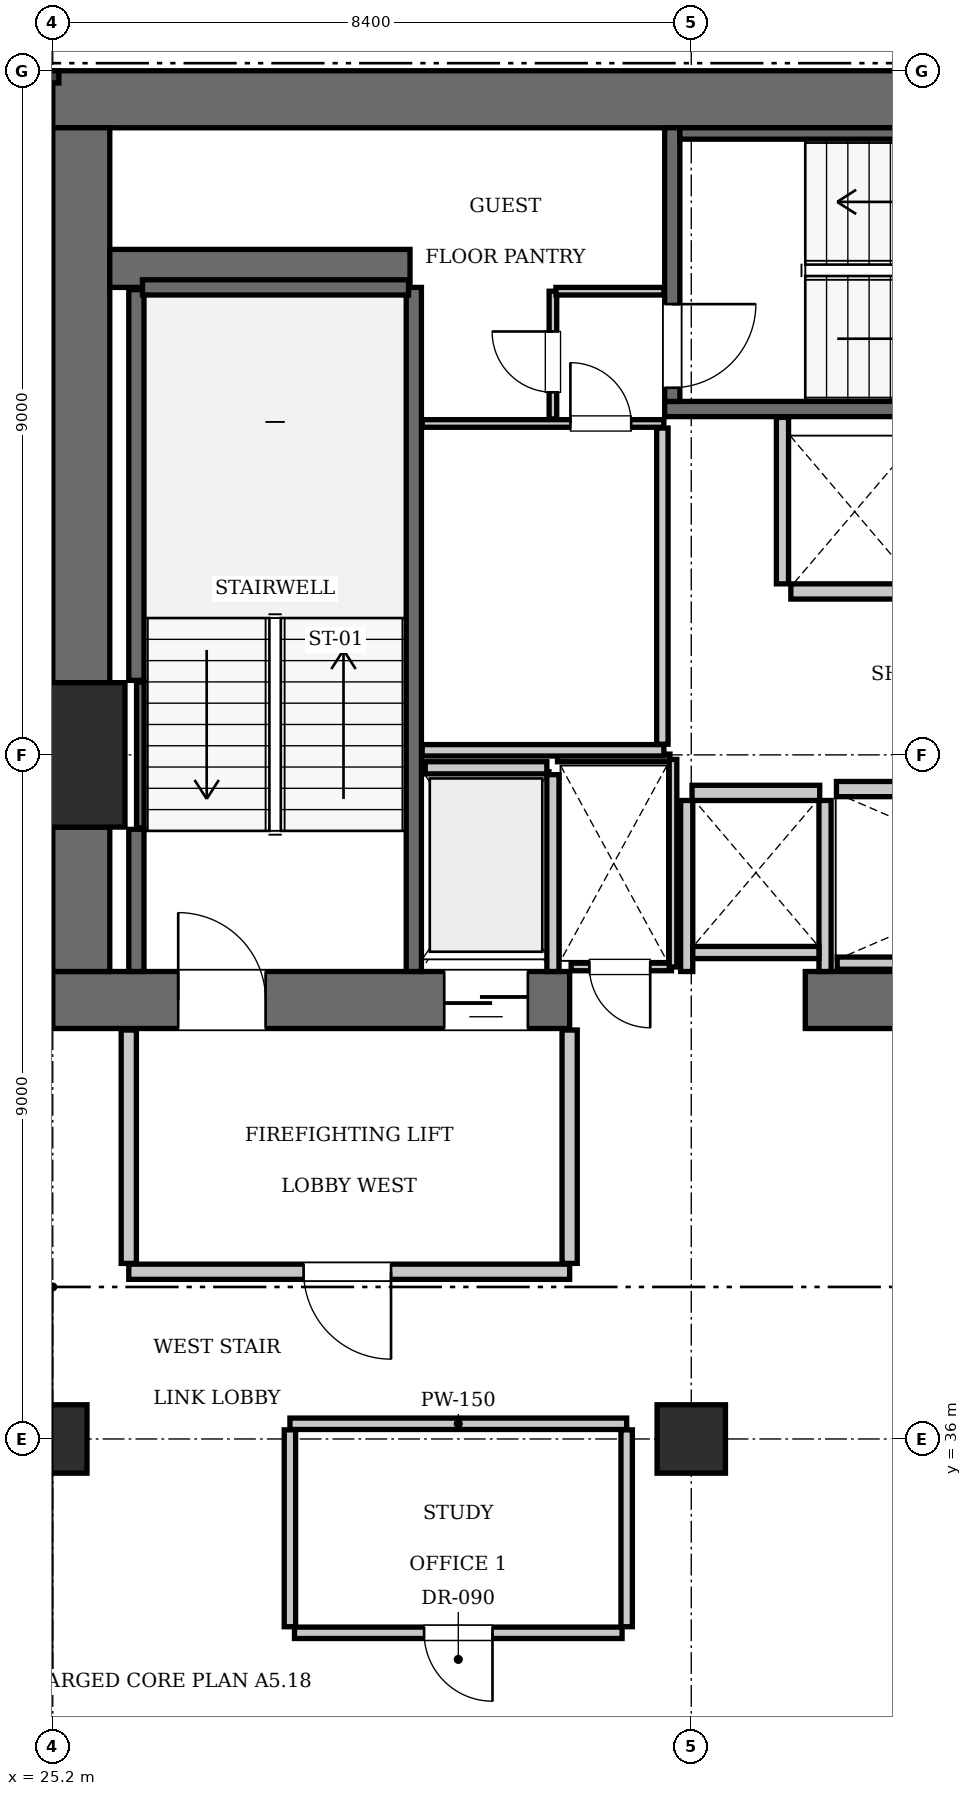
"""IFC4 building model, lengths in metres.
Left out: names, types, materials, properties, quantities, classifications, styles, units other than length and angle.
Written with IfcOpenShell. Run it as: python <this file> out.ifc"""

import sys

from ifc_helpers import new_model, si_unit, direction, frame, frame_2d, origin, origin_2d, place, context, subcontext, project, spatial, rectangle, extrude, element, fill, save


model = new_model("IFC4")
c1 = context("Model", 3, precision=1e-05, world=origin(), true_north=direction((0.0, 1.0)))
c2 = subcontext(c1, "Body", "Model", "MODEL_VIEW")
j1 = project(units=[si_unit("LENGTHUNIT", "METRE"), si_unit("PLANEANGLEUNIT", "RADIAN")], contexts=[c1])
p1 = place(None, origin())
s1 = spatial("IfcSite", under=j1, at=p1, CompositionType="ELEMENT")
p2 = place(p1, origin())
s2 = spatial("IfcBuilding", under=s1, at=p2, CompositionType="ELEMENT")
p3 = place(p2, frame((0.0, 0.0, 154.35)))
s3 = spatial("IfcBuildingStorey", under=s2, at=p3, CompositionType="ELEMENT", Elevation=154.35)
p4 = place(p3, frame((25.2, 45.0, 0.0), z_axis=(0.0, 0.0, 1.0), x_axis=(1.0, 0.0, 0.0)))
e1 = element("IfcColumn", 1, at=p4, inside=s3, PredefinedType="COLUMN", context=c2, shape_type="SweptSolid", body=[
    extrude(rectangle(XDim=1.9, YDim=1.9, at=origin_2d()), origin(), (0.0, 0.0, 1.0), 3.85),
])
p5 = place(p3, frame((25.2, 53.625, 0.0), z_axis=(0.0, 0.0, 1.0), x_axis=(1.0, 0.0, 0.0)))
e2 = element("IfcWall", 2, at=p5, inside=s3, PredefinedType="SHEAR", context=c2, shape_type="SweptSolid", body=[
    extrude(rectangle(XDim=25.2, YDim=0.75, at=frame_2d((12.6, 0.0))), origin(), (0.0, 0.0, 1.0), 3.85),
])
p6 = place(p3, frame((25.2, 41.775, 0.0), z_axis=(0.0, 0.0, 1.0), x_axis=(1.0, 0.0, 0.0)))
e3 = element("IfcWall", 3, at=p6, inside=s3, PredefinedType="SHEAR", context=c2, shape_type="SweptSolid", body=[
    extrude(rectangle(XDim=6.8, YDim=0.75, at=frame_2d((3.4, 0.0))), origin(), (0.0, 0.0, 1.0), 3.85),
])
p7 = place(p6, frame((1.65, 0.0, 0.0)))
e4 = element("IfcOpeningElement", 4, at=p7, cuts=e3, PredefinedType="OPENING", context=c2, shape_type="SweptSolid", body=[
    extrude(rectangle(XDim=1.15, YDim=2.15, at=frame_2d((0.575, 1.075))), frame((0.0, 0.385, 0.0), z_axis=(0.0, -1.0, 0.0), x_axis=(1.0, 0.0, 0.0)), (0.0, 0.0, 1.0), 0.77),
])
p8 = place(p6, frame((5.15, 0.0, 0.0)))
e5 = element("IfcOpeningElement", 5, at=p8, cuts=e3, PredefinedType="OPENING", context=c2, shape_type="SweptSolid", body=[
    extrude(rectangle(XDim=1.1, YDim=2.2, at=frame_2d((0.55, 1.1))), frame((0.0, 0.385, 0.0), z_axis=(0.0, -1.0, 0.0), x_axis=(1.0, 0.0, 0.0)), (0.0, 0.0, 1.0), 0.77),
])
p9 = place(p3, frame((35.1, 41.775, 0.0), z_axis=(0.0, 0.0, 1.0), x_axis=(1.0, 0.0, 0.0)))
e6 = element("IfcWall", 6, at=p9, inside=s3, PredefinedType="SHEAR", context=c2, shape_type="SweptSolid", body=[
    extrude(rectangle(XDim=5.4, YDim=0.75, at=frame_2d((2.7, 0.0))), origin(), (0.0, 0.0, 1.0), 3.85),
])
p10 = place(p3, frame((25.575, 42.15, 0.0), z_axis=(0.0, 0.0, 1.0), x_axis=(0.0, 1.0, 0.0)))
e7 = element("IfcWall", 7, at=p10, inside=s3, PredefinedType="SHEAR", context=c2, shape_type="SweptSolid", body=[
    extrude(rectangle(XDim=1.9, YDim=0.75, at=frame_2d((0.95, 0.0))), origin(), (0.0, 0.0, 1.0), 3.85),
])
p11 = place(p3, frame((25.575, 45.95, 0.0), z_axis=(0.0, 0.0, 1.0), x_axis=(0.0, 1.0, 0.0)))
e8 = element("IfcWall", 8, at=p11, inside=s3, PredefinedType="SHEAR", context=c2, shape_type="SweptSolid", body=[
    extrude(rectangle(XDim=7.3, YDim=0.75, at=frame_2d((3.65, 0.0))), origin(), (0.0, 0.0, 1.0), 3.85),
])
p12 = place(p3, frame((25.95, 51.4, 0.0), z_axis=(0.0, 0.0, 1.0), x_axis=(1.0, 0.0, 0.0)))
e9 = element("IfcWall", 9, at=p12, inside=s3, PredefinedType="SHEAR", context=c2, shape_type="SweptSolid", body=[
    extrude(rectangle(XDim=3.95, YDim=0.5, at=frame_2d((1.975, 0.0))), origin(), (0.0, 0.0, 1.0), 3.85),
])
for number, where, z_axis, x_axis in (
    (10, (25.2, 36.0, 0.0), (0.0, 0.0, 1.0), (1.0, 0.0, 0.0)),
    (11, (33.6, 36.0, 0.0), (0.0, 0.0, 1.0), (1.0, 0.0, 0.0)),
):
    element("IfcColumn", number, at=place(p3, frame(where, z_axis=z_axis, x_axis=x_axis)), inside=s3, PredefinedType="COLUMN", context=c2, shape_type="SweptSolid", body=[
        extrude(rectangle(XDim=0.9, YDim=0.9, at=origin_2d()), origin(), (0.0, 0.0, 1.0), 3.85),
    ])
p13 = place(p3, frame((29.95, 42.15, 0.0), z_axis=(0.0, 0.0, 1.0), x_axis=(0.0, 1.0, 0.0)))
e12 = element("IfcWall", 12, at=p13, inside=s3, PredefinedType="SOLIDWALL", context=c2, shape_type="SweptSolid", body=[
    extrude(rectangle(XDim=9.0, YDim=0.2, at=frame_2d((4.5, 0.0))), origin(), (0.0, 0.0, 1.0), 3.61),
])
p14 = place(p3, frame((26.3, 42.15, 0.0), z_axis=(0.0, 0.0, 1.0), x_axis=(0.0, 1.0, 0.0)))
e13 = element("IfcWall", 13, at=p14, inside=s3, PredefinedType="SOLIDWALL", context=c2, shape_type="SweptSolid", body=[
    extrude(rectangle(XDim=1.87, YDim=0.2, at=frame_2d((0.935, 0.0))), origin(), (0.0, 0.0, 1.0), 3.61),
])
p15 = place(p3, frame((26.3, 45.98, 0.0), z_axis=(0.0, 0.0, 1.0), x_axis=(0.0, 1.0, 0.0)))
e14 = element("IfcWall", 14, at=p15, inside=s3, PredefinedType="SOLIDWALL", context=c2, shape_type="SweptSolid", body=[
    extrude(rectangle(XDim=5.14, YDim=0.2, at=frame_2d((2.57, 0.0))), origin(), (0.0, 0.0, 1.0), 3.61),
])
p16 = place(p3, frame((26.38, 51.15, 0.0), z_axis=(0.0, 0.0, 1.0), x_axis=(1.0, 0.0, 0.0)))
e15 = element("IfcWall", 15, at=p16, inside=s3, PredefinedType="SOLIDWALL", context=c2, shape_type="SweptSolid", body=[
    extrude(rectangle(XDim=3.5, YDim=0.2, at=frame_2d((1.75, 0.0))), origin(), (0.0, 0.0, 1.0), 3.61),
])
p17 = place(p3, frame((26.352, 44.04, 0.0), z_axis=(0.0, 0.0, 1.0), x_axis=(0.0, 1.0, 0.0)))
e16 = element("IfcWall", 16, at=p17, inside=s3, PredefinedType="SOLIDWALL", context=c2, shape_type="SweptSolid", body=[
    extrude(rectangle(XDim=1.92, YDim=0.1, at=frame_2d((0.96, 0.0))), origin(), (0.0, 0.0, 1.0), 3.61),
])
p18 = place(p3, frame((33.25, 49.55, 0.0), z_axis=(0.0, 0.0, 1.0), x_axis=(1.0, 0.0, 0.0)))
e17 = element("IfcWall", 17, at=p18, inside=s3, PredefinedType="SOLIDWALL", context=c2, shape_type="SweptSolid", body=[
    extrude(rectangle(XDim=9.1, YDim=0.2, at=frame_2d((4.55, 0.0))), origin(), (0.0, 0.0, 1.0), 3.61),
])
p19 = place(p3, frame((33.35, 49.65, 0.0), z_axis=(0.0, 0.0, 1.0), x_axis=(0.0, 1.0, 0.0)))
e18 = element("IfcWall", 18, at=p19, inside=s3, PredefinedType="SOLIDWALL", context=c2, shape_type="SweptSolid", body=[
    extrude(rectangle(XDim=3.6, YDim=0.2, at=frame_2d((1.8, 0.0))), origin(), (0.0, 0.0, 1.0), 3.61),
])
p20 = place(p19, frame((0.18, 0.0, 0.0)))
e19 = element("IfcOpeningElement", 19, at=p20, cuts=e18, PredefinedType="OPENING", context=c2, shape_type="SweptSolid", body=[
    extrude(rectangle(XDim=1.1, YDim=2.15, at=frame_2d((0.55, 1.075))), frame((0.0, 0.11, 0.0), z_axis=(0.0, -1.0, 0.0), x_axis=(1.0, 0.0, 0.0)), (0.0, 0.0, 1.0), 0.22),
])
p21 = place(p3, frame((33.45, 53.175, 0.0), z_axis=(0.0, 0.0, 1.0), x_axis=(1.0, 0.0, 0.0)))
e20 = element("IfcWall", 20, at=p21, inside=s3, PredefinedType="SOLIDWALL", context=c2, shape_type="SweptSolid", body=[
    extrude(rectangle(XDim=8.7, YDim=0.15, at=frame_2d((4.35, 0.0))), origin(), (0.0, 0.0, 1.0), 3.61),
])
p22 = place(p3, frame((35.51, 44.55, 0.0), z_axis=(0.0, 0.0, 1.0), x_axis=(1.0, 0.0, 0.0)))
e21 = element("IfcWall", 21, at=p22, inside=s3, PredefinedType="SOLIDWALL", context=c2, shape_type="SweptSolid", body=[
    extrude(rectangle(XDim=1.68, YDim=0.2, at=frame_2d((0.84, 0.0))), origin(), (0.0, 0.0, 1.0), 3.61),
])
p23 = place(p3, frame((34.91, 47.15, 0.0), z_axis=(0.0, 0.0, 1.0), x_axis=(1.0, 0.0, 0.0)))
e22 = element("IfcWall", 22, at=p23, inside=s3, PredefinedType="SOLIDWALL", context=c2, shape_type="SweptSolid", body=[
    extrude(rectangle(XDim=1.68, YDim=0.2, at=frame_2d((0.84, 0.0))), origin(), (0.0, 0.0, 1.0), 3.61),
])
p24 = place(p3, frame((33.61, 44.5, 0.0), z_axis=(0.0, 0.0, 1.0), x_axis=(1.0, 0.0, 0.0)))
e23 = element("IfcWall", 23, at=p24, inside=s3, PredefinedType="SOLIDWALL", context=c2, shape_type="SweptSolid", body=[
    extrude(rectangle(XDim=1.68, YDim=0.2, at=frame_2d((0.84, 0.0))), origin(), (0.0, 0.0, 1.0), 3.61),
])
p25 = place(p3, frame((30.1, 44.83, 0.0), z_axis=(0.0, 0.0, 1.0), x_axis=(1.0, 0.0, 0.0)))
e24 = element("IfcWall", 24, at=p25, inside=s3, PredefinedType="SOLIDWALL", context=c2, shape_type="SweptSolid", body=[
    extrude(rectangle(XDim=1.6, YDim=0.16, at=frame_2d((0.8, 0.0))), origin(), (0.0, 0.0, 1.0), 3.61),
])
p26 = place(p3, frame((31.78, 42.15, 0.0), z_axis=(0.0, 0.0, 1.0), x_axis=(0.0, 1.0, 0.0)))
e25 = element("IfcWall", 25, at=p26, inside=s3, PredefinedType="SOLIDWALL", context=c2, shape_type="SweptSolid", body=[
    extrude(rectangle(XDim=2.59, YDim=0.16, at=frame_2d((1.295, 0.0))), origin(), (0.0, 0.0, 1.0), 3.61),
])
p27 = place(p3, frame((35.52, 42.26, 0.0), z_axis=(0.0, 0.0, 1.0), x_axis=(1.0, 0.0, 0.0)))
e26 = element("IfcWall", 26, at=p27, inside=s3, PredefinedType="SOLIDWALL", context=c2, shape_type="SweptSolid", body=[
    extrude(rectangle(XDim=5.02, YDim=0.16, at=frame_2d((2.51, 0.0))), origin(), (0.0, 0.0, 1.0), 3.61),
])
p28 = place(p3, frame((34.8, 47.25, 0.0), z_axis=(0.0, 0.0, 1.0), x_axis=(0.0, 1.0, 0.0)))
e27 = element("IfcWall", 27, at=p28, inside=s3, PredefinedType="SOLIDWALL", context=c2, shape_type="SweptSolid", body=[
    extrude(rectangle(XDim=2.19, YDim=0.16, at=frame_2d((1.095, 0.0))), origin(), (0.0, 0.0, 1.0), 3.61),
])
for number, where, z_axis, x_axis in (
    (28, (33.54, 42.15, 0.0), (0.0, 0.0, 1.0), (0.0, 1.0, 0.0)),
    (29, (35.36, 42.15, 0.0), (0.0, 0.0, 1.0), (0.0, 1.0, 0.0)),
):
    element("IfcWall", number, at=place(p3, frame(where, z_axis=z_axis, x_axis=x_axis)), inside=s3, PredefinedType="SOLIDWALL", context=c2, shape_type="SweptSolid", body=[
        extrude(rectangle(XDim=2.25, YDim=0.16, at=frame_2d((1.125, 0.0))), origin(), (0.0, 0.0, 1.0), 3.61),
    ])
p29 = place(p3, frame((33.62, 42.4, 0.0), z_axis=(0.0, 0.0, 1.0), x_axis=(1.0, 0.0, 0.0)))
e30 = element("IfcWall", 30, at=p29, inside=s3, PredefinedType="SOLIDWALL", context=c2, shape_type="SweptSolid", body=[
    extrude(rectangle(XDim=1.66, YDim=0.16, at=frame_2d((0.83, 0.0))), origin(), (0.0, 0.0, 1.0), 3.61),
])
p30 = place(p3, frame((26.2, 38.2, 0.0), z_axis=(0.0, 0.0, 1.0), x_axis=(1.0, 0.0, 0.0)))
e31 = element("IfcWall", 31, at=p30, inside=s3, PredefinedType="PARTITIONING", context=c2, shape_type="SweptSolid", body=[
    extrude(rectangle(XDim=5.8, YDim=0.2, at=frame_2d((2.9, 0.0))), origin(), (0.0, 0.0, 1.0), 3.61),
])
p31 = place(p30, frame((2.3, 0.0, 0.0)))
e32 = element("IfcOpeningElement", 32, at=p31, cuts=e31, PredefinedType="OPENING", context=c2, shape_type="SweptSolid", body=[
    extrude(rectangle(XDim=1.15, YDim=2.15, at=frame_2d((0.575, 1.075))), frame((0.0, 0.11, 0.0), z_axis=(0.0, -1.0, 0.0), x_axis=(1.0, 0.0, 0.0)), (0.0, 0.0, 1.0), 0.22),
])
for number, where, z_axis, x_axis in (
    (33, (26.2, 38.31, 0.0), (0.0, 0.0, 1.0), (0.0, 1.0, 0.0)),
    (34, (32.0, 38.31, 0.0), (0.0, 0.0, 1.0), (0.0, 1.0, 0.0)),
):
    element("IfcWall", number, at=place(p3, frame(where, z_axis=z_axis, x_axis=x_axis)), inside=s3, PredefinedType="PARTITIONING", context=c2, shape_type="SweptSolid", body=[
        extrude(rectangle(XDim=3.07, YDim=0.2, at=frame_2d((1.535, 0.0))), origin(), (0.0, 0.0, 1.0), 3.61),
    ])
p32 = place(p3, frame((32.02, 42.21, 0.0), z_axis=(0.0, 0.0, 1.0), x_axis=(1.0, 0.0, 0.0)))
e35 = element("IfcWall", 35, at=p32, inside=s3, PredefinedType="PARTITIONING", context=c2, shape_type="SweptSolid", body=[
    extrude(rectangle(XDim=1.32, YDim=0.1, at=frame_2d((0.66, 0.0))), origin(), (0.0, 0.0, 1.0), 3.61),
])
p33 = place(p32, frame((0.24, 0.0, 0.0)))
e36 = element("IfcOpeningElement", 36, at=p33, cuts=e35, PredefinedType="OPENING", context=c2, shape_type="SweptSolid", body=[
    extrude(rectangle(XDim=0.8, YDim=2.05, at=frame_2d((0.4, 1.025))), frame((0.0, 0.06, 0.0), z_axis=(0.0, -1.0, 0.0), x_axis=(1.0, 0.0, 0.0)), (0.0, 0.0, 1.0), 0.12),
])
p34 = place(p3, frame((31.84, 44.96, 0.0), z_axis=(0.0, 0.0, 1.0), x_axis=(1.0, 0.0, 0.0)))
e37 = element("IfcWall", 37, at=p34, inside=s3, PredefinedType="PARTITIONING", context=c2, shape_type="SweptSolid", body=[
    extrude(rectangle(XDim=1.48, YDim=0.1, at=frame_2d((0.74, 0.0))), origin(), (0.0, 0.0, 1.0), 3.61),
])
p35 = place(p3, frame((33.36, 42.21, 0.0), z_axis=(0.0, 0.0, 1.0), x_axis=(0.0, 1.0, 0.0)))
e38 = element("IfcWall", 38, at=p35, inside=s3, PredefinedType="PARTITIONING", context=c2, shape_type="SweptSolid", body=[
    extrude(rectangle(XDim=2.73, YDim=0.1, at=frame_2d((1.365, 0.0))), origin(), (0.0, 0.0, 1.0), 3.61),
])
p36 = place(p3, frame((30.06, 45.06, 0.0), z_axis=(0.0, 0.0, 1.0), x_axis=(1.0, 0.0, 0.0)))
e39 = element("IfcWall", 39, at=p36, inside=s3, PredefinedType="PARTITIONING", context=c2, shape_type="SweptSolid", body=[
    extrude(rectangle(XDim=3.18, YDim=0.15, at=frame_2d((1.59, 0.0))), origin(), (0.0, 0.0, 1.0), 3.61),
])
p37 = place(p3, frame((33.22, 45.14, 0.0), z_axis=(0.0, 0.0, 1.0), x_axis=(0.0, 1.0, 0.0)))
e40 = element("IfcWall", 40, at=p37, inside=s3, PredefinedType="PARTITIONING", context=c2, shape_type="SweptSolid", body=[
    extrude(rectangle(XDim=4.16, YDim=0.15, at=frame_2d((2.08, 0.0))), origin(), (0.0, 0.0, 1.0), 3.61),
])
p38 = place(p3, frame((30.06, 49.36, 0.0), z_axis=(0.0, 0.0, 1.0), x_axis=(1.0, 0.0, 0.0)))
e41 = element("IfcWall", 41, at=p38, inside=s3, PredefinedType="PARTITIONING", context=c2, shape_type="SweptSolid", body=[
    extrude(rectangle(XDim=3.18, YDim=0.1, at=frame_2d((1.59, 0.0))), origin(), (0.0, 0.0, 1.0), 3.61),
])
p39 = place(p38, frame((1.95, 0.0, 0.0)))
e42 = element("IfcOpeningElement", 42, at=p39, cuts=e41, PredefinedType="OPENING", context=c2, shape_type="SweptSolid", body=[
    extrude(rectangle(XDim=0.8, YDim=2.05, at=frame_2d((0.4, 1.025))), frame((0.0, 0.06, 0.0), z_axis=(0.0, -1.0, 0.0), x_axis=(1.0, 0.0, 0.0)), (0.0, 0.0, 1.0), 0.12),
])
p40 = place(p3, frame((31.78, 49.42, 0.0), z_axis=(0.0, 0.0, 1.0), x_axis=(0.0, 1.0, 0.0)))
e43 = element("IfcWall", 43, at=p40, inside=s3, PredefinedType="PARTITIONING", context=c2, shape_type="SweptSolid", body=[
    extrude(rectangle(XDim=1.68, YDim=0.1, at=frame_2d((0.84, 0.0))), origin(), (0.0, 0.0, 1.0), 3.61),
])
p41 = place(p40, frame((0.35, 0.0, 0.0)))
e44 = element("IfcOpeningElement", 44, at=p41, cuts=e43, PredefinedType="OPENING", context=c2, shape_type="SweptSolid", body=[
    extrude(rectangle(XDim=0.8, YDim=2.05, at=frame_2d((0.4, 1.025))), frame((0.0, 0.06, 0.0), z_axis=(0.0, -1.0, 0.0), x_axis=(1.0, 0.0, 0.0)), (0.0, 0.0, 1.0), 0.12),
])
p42 = place(p3, frame((31.82, 51.1, 0.0), z_axis=(0.0, 0.0, 1.0), x_axis=(1.0, 0.0, 0.0)))
e45 = element("IfcWall", 45, at=p42, inside=s3, PredefinedType="PARTITIONING", context=c2, shape_type="SweptSolid", body=[
    extrude(rectangle(XDim=1.42, YDim=0.1, at=frame_2d((0.71, 0.0))), origin(), (0.0, 0.0, 1.0), 3.61),
])
p43 = place(p3, frame((28.32, 36.2, 0.0), z_axis=(0.0, 0.0, 1.0), x_axis=(1.0, 0.0, 0.0)))
e46 = element("IfcWall", 46, at=p43, inside=s3, PredefinedType="PARTITIONING", context=c2, shape_type="SweptSolid", body=[
    extrude(rectangle(XDim=4.43, YDim=0.15, at=frame_2d((2.215, 0.0))), origin(), (0.0, 0.0, 1.0), 3.61),
])
for number, where, z_axis, x_axis in (
    (47, (28.32, 33.53, 0.0), (0.0, 0.0, 1.0), (0.0, 1.0, 0.0)),
    (48, (32.75, 33.53, 0.0), (0.0, 0.0, 1.0), (0.0, 1.0, 0.0)),
):
    element("IfcWall", number, at=place(p3, frame(where, z_axis=z_axis, x_axis=x_axis)), inside=s3, PredefinedType="PARTITIONING", context=c2, shape_type="SweptSolid", body=[
        extrude(rectangle(XDim=2.59, YDim=0.15, at=frame_2d((1.295, 0.0))), origin(), (0.0, 0.0, 1.0), 3.61),
    ])
p44 = place(p3, frame((28.38, 33.45, 0.0), z_axis=(0.0, 0.0, 1.0), x_axis=(1.0, 0.0, 0.0)))
e49 = element("IfcWall", 49, at=p44, inside=s3, PredefinedType="PARTITIONING", context=c2, shape_type="SweptSolid", body=[
    extrude(rectangle(XDim=4.31, YDim=0.15, at=frame_2d((2.155, 0.0))), origin(), (0.0, 0.0, 1.0), 3.61),
])
p45 = place(p44, frame((1.705, 0.0, 0.0)))
e50 = element("IfcOpeningElement", 50, at=p45, cuts=e49, PredefinedType="OPENING", context=c2, shape_type="SweptSolid", body=[
    extrude(rectangle(XDim=0.9, YDim=2.1, at=frame_2d((0.45, 1.05))), frame((0.0, 0.085, 0.0), z_axis=(0.0, -1.0, 0.0), x_axis=(1.0, 0.0, 0.0)), (0.0, 0.0, 1.0), 0.17),
])
p46 = place(p7, origin())
e51 = element("IfcDoor", 51, at=p46, inside=s3, OperationType="SINGLE_SWING_LEFT", PredefinedType="DOOR", context=c2, shape_type="SweptSolid", body=[
    extrude(rectangle(XDim=1.15, YDim=2.15, at=frame_2d((0.575, 1.075))), frame((0.0, 0.025, 0.0), z_axis=(0.0, -1.0, 0.0), x_axis=(1.0, 0.0, 0.0)), (0.0, 0.0, 1.0), 0.05),
])
fill(e4, e51)
p47 = place(p20, frame((1.1, 0.0, 0.0), z_axis=(0.0, 0.0, 1.0), x_axis=(-1.0, 0.0, 0.0)))
e52 = element("IfcDoor", 52, at=p47, inside=s3, OperationType="SINGLE_SWING_LEFT", PredefinedType="DOOR", context=c2, shape_type="SweptSolid", body=[
    extrude(rectangle(XDim=1.1, YDim=2.15, at=frame_2d((0.55, 1.075))), frame((0.0, 0.025, 0.0), z_axis=(0.0, -1.0, 0.0), x_axis=(1.0, 0.0, 0.0)), (0.0, 0.0, 1.0), 0.05),
])
fill(e19, e52)
p48 = place(p8, frame((1.1, 0.0, 0.0), z_axis=(0.0, 0.0, 1.0), x_axis=(-1.0, 0.0, 0.0)))
e53 = element("IfcDoor", 53, at=p48, inside=s3, OperationType="SLIDING_TO_LEFT", PredefinedType="DOOR", context=c2, shape_type="SweptSolid", body=[
    extrude(rectangle(XDim=1.1, YDim=2.2, at=frame_2d((0.55, 1.1))), frame((0.0, 0.025, 0.0), z_axis=(0.0, -1.0, 0.0), x_axis=(1.0, 0.0, 0.0)), (0.0, 0.0, 1.0), 0.05),
])
fill(e5, e53)
p49 = place(p31, frame((1.15, 0.0, 0.0), z_axis=(0.0, 0.0, 1.0), x_axis=(-1.0, 0.0, 0.0)))
e54 = element("IfcDoor", 54, at=p49, inside=s3, OperationType="SINGLE_SWING_LEFT", PredefinedType="DOOR", context=c2, shape_type="SweptSolid", body=[
    extrude(rectangle(XDim=1.15, YDim=2.15, at=frame_2d((0.575, 1.075))), frame((0.0, 0.025, 0.0), z_axis=(0.0, -1.0, 0.0), x_axis=(1.0, 0.0, 0.0)), (0.0, 0.0, 1.0), 0.05),
])
fill(e32, e54)
p50 = place(p33, frame((0.8, 0.0, 0.0), z_axis=(0.0, 0.0, 1.0), x_axis=(-1.0, 0.0, 0.0)))
e55 = element("IfcDoor", 55, at=p50, inside=s3, OperationType="SINGLE_SWING_LEFT", PredefinedType="DOOR", context=c2, shape_type="SweptSolid", body=[
    extrude(rectangle(XDim=0.8, YDim=2.05, at=frame_2d((0.4, 1.025))), frame((0.0, 0.025, 0.0), z_axis=(0.0, -1.0, 0.0), x_axis=(1.0, 0.0, 0.0)), (0.0, 0.0, 1.0), 0.05),
])
fill(e36, e55)
p51 = place(p39, origin())
e56 = element("IfcDoor", 56, at=p51, inside=s3, OperationType="SINGLE_SWING_LEFT", PredefinedType="DOOR", context=c2, shape_type="SweptSolid", body=[
    extrude(rectangle(XDim=0.8, YDim=2.05, at=frame_2d((0.4, 1.025))), frame((0.0, 0.025, 0.0), z_axis=(0.0, -1.0, 0.0), x_axis=(1.0, 0.0, 0.0)), (0.0, 0.0, 1.0), 0.05),
])
fill(e42, e56)
p52 = place(p41, origin())
e57 = element("IfcDoor", 57, at=p52, inside=s3, OperationType="SINGLE_SWING_RIGHT", PredefinedType="DOOR", context=c2, shape_type="SweptSolid", body=[
    extrude(rectangle(XDim=0.8, YDim=2.05, at=frame_2d((0.4, 1.025))), frame((0.0, 0.025, 0.0), z_axis=(0.0, -1.0, 0.0), x_axis=(1.0, 0.0, 0.0)), (0.0, 0.0, 1.0), 0.05),
])
fill(e44, e57)
p53 = place(p45, frame((0.9, 0.0, 0.0), z_axis=(0.0, 0.0, 1.0), x_axis=(-1.0, 0.0, 0.0)))
e58 = element("IfcDoor", 58, at=p53, inside=s3, OperationType="SINGLE_SWING_LEFT", PredefinedType="DOOR", context=c2, shape_type="SweptSolid", body=[
    extrude(rectangle(XDim=0.9, YDim=2.1, at=frame_2d((0.45, 1.05))), frame((0.0, 0.025, 0.0), z_axis=(0.0, -1.0, 0.0), x_axis=(1.0, 0.0, 0.0)), (0.0, 0.0, 1.0), 0.05),
])
fill(e50, e58)
save(model, sys.argv[1])
